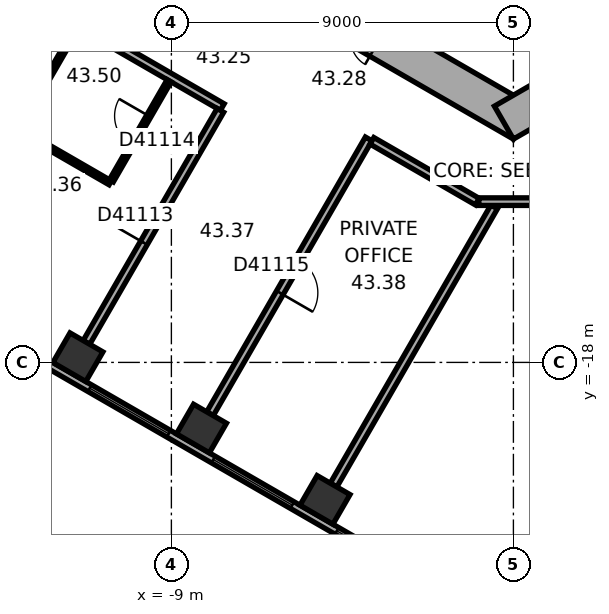
"""IFC4 building model, lengths in metres.
Left out: names, types, materials, properties, quantities, classifications, styles, units other than length and angle.
Written with IfcOpenShell. Run it as: python <this file> out.ifc"""

import sys

from ifc_helpers import new_model, si_unit, direction, frame, frame_2d, origin, origin_2d, place, context, subcontext, project, spatial, rectangle, extrude, element, fill, save


model = new_model("IFC4")
c1 = context("Model", 3, precision=1e-05, world=origin(), true_north=direction((0.0, 1.0)))
c2 = subcontext(c1, "Body", "Model", "MODEL_VIEW")
j1 = project(units=[si_unit("LENGTHUNIT", "METRE"), si_unit("PLANEANGLEUNIT", "RADIAN")], contexts=[c1])
p1 = place(None, origin())
s1 = spatial("IfcSite", under=j1, at=p1, CompositionType="ELEMENT")
p2 = place(p1, origin())
s2 = spatial("IfcBuilding", under=s1, at=p2, CompositionType="ELEMENT")
p3 = place(p2, frame((0.0, 0.0, 176.2)))
s3 = spatial("IfcBuildingStorey", under=s2, at=p3, CompositionType="ELEMENT", Elevation=176.2)
for number, where, z_axis, x_axis in (
    (1, (-11.46, -17.863, 0.0), (0.0, 0.0, 1.0), (0.866, -0.5, 0.0)),
    (2, (-8.208, -19.74, 0.0), (0.0, 0.0, 1.0), (0.866, -0.5, 0.0)),
    (3, (-4.958, -21.617, 0.0), (0.0, 0.0, 1.0), (0.866, -0.5, 0.0)),
):
    element("IfcColumn", number, at=place(p3, frame(where, z_axis=z_axis, x_axis=x_axis)), inside=s3, PredefinedType="COLUMN", context=c2, shape_type="SweptSolid", body=[
        extrude(rectangle(XDim=1.0, YDim=0.9, at=origin_2d()), origin(), (0.0, 0.0, 1.0), 3.7),
    ])
p4 = place(p3, frame((-10.25, -5.629, 0.0), z_axis=(0.0, 0.0, 1.0), x_axis=(0.866022616891, -0.50000482701, 0.0)))
e4 = element("IfcWall", 4, at=p4, inside=s3, PredefinedType="SHEAR", context=c2, shape_type="SweptSolid", body=[
    extrude(rectangle(XDim=12.125, YDim=1.0, at=frame_2d((6.062, 0.0))), origin(), (0.0, 0.0, 1.0), 3.7),
])
p5 = place(p4, frame((6.262, 0.0, 0.0)))
e5 = element("IfcOpeningElement", 5, at=p5, cuts=e4, PredefinedType="OPENING", context=c2, shape_type="SweptSolid", body=[
    extrude(rectangle(XDim=1.5, YDim=2.1, at=frame_2d((0.75, 1.05))), frame((0.0, 0.51, 0.0), z_axis=(0.0, -1.0, 0.0), x_axis=(1.0, 0.0, 0.0)), (0.0, 0.0, 1.0), 1.02),
])
p6 = place(p4, frame((1.712, 0.0, 0.0)))
e6 = element("IfcOpeningElement", 6, at=p6, cuts=e4, PredefinedType="OPENING", context=c2, shape_type="SweptSolid", body=[
    extrude(rectangle(XDim=1.1, YDim=2.1, at=frame_2d((0.55, 1.05))), frame((0.0, 0.51, 0.0), z_axis=(0.0, -1.0, 0.0), x_axis=(1.0, 0.0, 0.0)), (0.0, 0.0, 1.0), 1.02),
])
p7 = place(p4, frame((4.312, 0.0, 0.0)))
e7 = element("IfcOpeningElement", 7, at=p7, cuts=e4, PredefinedType="OPENING", context=c2, shape_type="SweptSolid", body=[
    extrude(rectangle(XDim=1.1, YDim=2.1, at=frame_2d((0.55, 1.05))), frame((0.0, 0.51, 0.0), z_axis=(0.0, -1.0, 0.0), x_axis=(1.0, 0.0, 0.0)), (0.0, 0.0, 1.0), 1.02),
])
p8 = place(p3, frame((-0.25, -11.691, 0.0), z_axis=(0.0, 0.0, 1.0), x_axis=(0.866022616891, 0.50000482701, 0.0)))
e8 = element("IfcWall", 8, at=p8, inside=s3, PredefinedType="SHEAR", context=c2, shape_type="SweptSolid", body=[
    extrude(rectangle(XDim=12.125, YDim=1.0, at=frame_2d((6.062, 0.0))), origin(), (0.0, 0.0, 1.0), 3.7),
])
p9 = place(p8, frame((2.612, 0.0, 0.0)))
e9 = element("IfcOpeningElement", 9, at=p9, cuts=e8, PredefinedType="OPENING", context=c2, shape_type="SweptSolid", body=[
    extrude(rectangle(XDim=1.1, YDim=2.1, at=frame_2d((0.55, 1.05))), frame((0.0, 0.51, 0.0), z_axis=(0.0, -1.0, 0.0), x_axis=(1.0, 0.0, 0.0)), (0.0, 0.0, 1.0), 1.02),
])
p10 = place(p8, frame((5.212, 0.0, 0.0)))
e10 = element("IfcOpeningElement", 10, at=p10, cuts=e8, PredefinedType="OPENING", context=c2, shape_type="SweptSolid", body=[
    extrude(rectangle(XDim=1.1, YDim=2.1, at=frame_2d((0.55, 1.05))), frame((0.0, 0.51, 0.0), z_axis=(0.0, -1.0, 0.0), x_axis=(1.0, 0.0, 0.0)), (0.0, 0.0, 1.0), 1.02),
])
p11 = place(p8, frame((7.812, 0.0, 0.0)))
e11 = element("IfcOpeningElement", 11, at=p11, cuts=e8, PredefinedType="OPENING", context=c2, shape_type="SweptSolid", body=[
    extrude(rectangle(XDim=1.1, YDim=2.1, at=frame_2d((0.55, 1.05))), frame((0.0, 0.51, 0.0), z_axis=(0.0, -1.0, 0.0), x_axis=(1.0, 0.0, 0.0)), (0.0, 0.0, 1.0), 1.02),
])
p12 = place(p3, frame((-18.789, -14.267, 0.0), z_axis=(0.0, 0.0, 1.0), x_axis=(0.866023315909, -0.500003616288, 0.0)))
e12 = element("IfcWall", 12, at=p12, inside=s3, PredefinedType="STANDARD", context=c2, shape_type="SweptSolid", body=[
    extrude(rectangle(XDim=20.044, YDim=0.2, at=frame_2d((10.022, 0.0))), origin(), (0.0, 0.0, 1.0), 3.7),
])
p13 = place(p12, frame((1.314, 0.0, 0.9)))
e13 = element("IfcOpeningElement", 13, at=p13, cuts=e12, PredefinedType="OPENING", context=c2, shape_type="SweptSolid", body=[
    extrude(rectangle(XDim=2.4, YDim=2.0, at=frame_2d((1.2, 1.0))), frame((0.0, 0.11, 0.0), z_axis=(0.0, -1.0, 0.0), x_axis=(1.0, 0.0, 0.0)), (0.0, 0.0, 1.0), 0.22),
])
p14 = place(p12, frame((5.069, 0.0, 0.9)))
e14 = element("IfcOpeningElement", 14, at=p14, cuts=e12, PredefinedType="OPENING", context=c2, shape_type="SweptSolid", body=[
    extrude(rectangle(XDim=2.4, YDim=2.0, at=frame_2d((1.2, 1.0))), frame((0.0, 0.11, 0.0), z_axis=(0.0, -1.0, 0.0), x_axis=(1.0, 0.0, 0.0)), (0.0, 0.0, 1.0), 0.22),
])
p15 = place(p12, frame((8.823, 0.0, 0.9)))
e15 = element("IfcOpeningElement", 15, at=p15, cuts=e12, PredefinedType="OPENING", context=c2, shape_type="SweptSolid", body=[
    extrude(rectangle(XDim=2.4, YDim=2.0, at=frame_2d((1.2, 1.0))), frame((0.0, 0.11, 0.0), z_axis=(0.0, -1.0, 0.0), x_axis=(1.0, 0.0, 0.0)), (0.0, 0.0, 1.0), 0.22),
])
p16 = place(p12, frame((12.577, 0.0, 0.9)))
e16 = element("IfcOpeningElement", 16, at=p16, cuts=e12, PredefinedType="OPENING", context=c2, shape_type="SweptSolid", body=[
    extrude(rectangle(XDim=2.4, YDim=2.0, at=frame_2d((1.2, 1.0))), frame((0.0, 0.11, 0.0), z_axis=(0.0, -1.0, 0.0), x_axis=(1.0, 0.0, 0.0)), (0.0, 0.0, 1.0), 0.22),
])
p17 = place(p12, frame((16.331, 0.0, 0.9)))
e17 = element("IfcOpeningElement", 17, at=p17, cuts=e12, PredefinedType="OPENING", context=c2, shape_type="SweptSolid", body=[
    extrude(rectangle(XDim=2.4, YDim=2.0, at=frame_2d((1.2, 1.0))), frame((0.0, 0.11, 0.0), z_axis=(0.0, -1.0, 0.0), x_axis=(1.0, 0.0, 0.0)), (0.0, 0.0, 1.0), 0.22),
])
p18 = place(p3, frame((0.013, -8.422, 0.0), z_axis=(0.0, 0.0, 1.0), x_axis=(0.500077893725, -0.86598042715, 0.0)))
e18 = element("IfcWall", 18, at=p18, inside=s3, PredefinedType="PARTITIONING", context=c2, shape_type="SweptSolid", body=[
    extrude(rectangle(XDim=2.2, YDim=0.2, at=frame_2d((1.1, 0.0))), origin(), (0.0, 0.0, 1.0), 3.42),
])
p19 = place(p3, frame((-13.035, -11.875, 0.0), z_axis=(0.0, 0.0, 1.0), x_axis=(0.500026960575, 0.86600983753, 0.0)))
e19 = element("IfcWall", 19, at=p19, inside=s3, PredefinedType="PARTITIONING", context=c2, shape_type="SweptSolid", body=[
    extrude(rectangle(XDim=3.1, YDim=0.12, at=frame_2d((1.55, 0.0))), origin(), (0.0, 0.0, 1.0), 3.42),
])
p20 = place(p3, frame((-11.435, -9.103, 0.0), z_axis=(0.0, 0.0, 1.0), x_axis=(0.866007399799, -0.500031182522, 0.0)))
e20 = element("IfcWall", 20, at=p20, inside=s3, PredefinedType="PARTITIONING", context=c2, shape_type="SweptSolid", body=[
    extrude(rectangle(XDim=4.358, YDim=0.2, at=frame_2d((2.179, 0.0))), origin(), (0.0, 0.0, 1.0), 3.42),
])
p21 = place(p3, frame((-11.235, -17.474, 0.0), z_axis=(0.0, 0.0, 1.0), x_axis=(0.500009260695, 0.866020057054, 0.0)))
e21 = element("IfcWall", 21, at=p21, inside=s3, PredefinedType="PARTITIONING", context=c2, shape_type="SweptSolid", body=[
    extrude(rectangle(XDim=7.049, YDim=0.2, at=frame_2d((3.524, 0.0))), origin(), (0.0, 0.0, 1.0), 2.87),
])
p22 = place(p21, frame((3.024, 0.0, 0.0)))
e22 = element("IfcOpeningElement", 22, at=p22, cuts=e21, PredefinedType="OPENING", context=c2, shape_type="SweptSolid", body=[
    extrude(rectangle(XDim=1.0, YDim=2.1, at=frame_2d((0.5, 1.05))), frame((0.0, 0.11, 0.0), z_axis=(0.0, -1.0, 0.0), x_axis=(1.0, 0.0, 0.0)), (0.0, 0.0, 1.0), 0.22),
])
p23 = place(p3, frame((-10.61, -13.275, 0.0), z_axis=(0.0, 0.0, 1.0), x_axis=(-0.866019409031, 0.500010383074, 0.0)))
e23 = element("IfcWall", 23, at=p23, inside=s3, PredefinedType="PARTITIONING", context=c2, shape_type="SweptSolid", body=[
    extrude(rectangle(XDim=2.74, YDim=0.12, at=frame_2d((1.37, 0.0))), origin(), (0.0, 0.0, 1.0), 3.42),
])
p24 = place(p3, frame((-9.06, -10.59, 0.0), z_axis=(0.0, 0.0, 1.0), x_axis=(-0.49993101378, -0.866065229334, 0.0)))
e24 = element("IfcWall", 24, at=p24, inside=s3, PredefinedType="PARTITIONING", context=c2, shape_type="SweptSolid", body=[
    extrude(rectangle(XDim=3.04, YDim=0.12, at=frame_2d((1.52, 0.0))), origin(), (0.0, 0.0, 1.0), 3.42),
])
p25 = place(p24, frame((1.07, 0.0, 0.0)))
e25 = element("IfcOpeningElement", 25, at=p25, cuts=e24, PredefinedType="OPENING", context=c2, shape_type="SweptSolid", body=[
    extrude(rectangle(XDim=0.9, YDim=2.1, at=frame_2d((0.45, 1.05))), frame((0.0, 0.07, 0.0), z_axis=(0.0, -1.0, 0.0), x_axis=(1.0, 0.0, 0.0)), (0.0, 0.0, 1.0), 0.14),
])
p26 = place(p3, frame((-7.984, -19.351, 0.0), z_axis=(0.0, 0.0, 1.0), x_axis=(0.500010139422, 0.866019549707, 0.0)))
e26 = element("IfcWall", 26, at=p26, inside=s3, PredefinedType="PARTITIONING", context=c2, shape_type="SweptSolid", body=[
    extrude(rectangle(XDim=8.35, YDim=0.2, at=frame_2d((4.175, 0.0))), origin(), (0.0, 0.0, 1.0), 3.42),
])
p27 = place(p26, frame((3.675, 0.0, 0.0)))
e27 = element("IfcOpeningElement", 27, at=p27, cuts=e26, PredefinedType="OPENING", context=c2, shape_type="SweptSolid", body=[
    extrude(rectangle(XDim=1.0, YDim=2.1, at=frame_2d((0.5, 1.05))), frame((0.0, 0.11, 0.0), z_axis=(0.0, -1.0, 0.0), x_axis=(1.0, 0.0, 0.0)), (0.0, 0.0, 1.0), 0.22),
])
p28 = place(p3, frame((-4.732, -21.228, 0.0), z_axis=(0.0, 0.0, 1.0), x_axis=(0.500000843414, 0.866024916838, 0.0)))
e28 = element("IfcWall", 28, at=p28, inside=s3, PredefinedType="PARTITIONING", context=c2, shape_type="SweptSolid", body=[
    extrude(rectangle(XDim=8.452, YDim=0.2, at=frame_2d((4.226, 0.0))), origin(), (0.0, 0.0, 1.0), 3.42),
])
p29 = place(p3, frame((-3.722, -12.169, 0.0), z_axis=(0.0, 0.0, 1.0), x_axis=(0.866033163891, -0.499986558861, 0.0)))
e29 = element("IfcWall", 29, at=p29, inside=s3, PredefinedType="PARTITIONING", context=c2, shape_type="SweptSolid", body=[
    extrude(rectangle(XDim=3.201, YDim=0.2, at=frame_2d((1.6, 0.0))), origin(), (0.0, 0.0, 1.0), 3.42),
])
p30 = place(p3, frame((-0.91, -13.77, 0.0), z_axis=(0.0, 0.0, 1.0), x_axis=(1.0, 0.0, 0.0)))
e30 = element("IfcWall", 30, at=p30, inside=s3, PredefinedType="PARTITIONING", context=c2, shape_type="SweptSolid", body=[
    extrude(rectangle(XDim=1.86, YDim=0.2, at=frame_2d((0.93, 0.0))), origin(), (0.0, 0.0, 1.0), 3.42),
])
p31 = place(p15, origin())
e31 = element("IfcWindow", 31, at=p31, inside=s3, PartitioningType="SINGLE_PANEL", PredefinedType="WINDOW", context=c2, shape_type="SweptSolid", body=[
    extrude(rectangle(XDim=2.4, YDim=2.0, at=frame_2d((1.2, 1.0))), frame((0.0, 0.03, 0.0), z_axis=(0.0, -1.0, 0.0), x_axis=(1.0, 0.0, 0.0)), (0.0, 0.0, 1.0), 0.06),
])
fill(e15, e31)
p32 = place(p16, origin())
e32 = element("IfcWindow", 32, at=p32, inside=s3, PartitioningType="SINGLE_PANEL", PredefinedType="WINDOW", context=c2, shape_type="SweptSolid", body=[
    extrude(rectangle(XDim=2.4, YDim=2.0, at=frame_2d((1.2, 1.0))), frame((0.0, 0.03, 0.0), z_axis=(0.0, -1.0, 0.0), x_axis=(1.0, 0.0, 0.0)), (0.0, 0.0, 1.0), 0.06),
])
fill(e16, e32)
p33 = place(p17, origin())
e33 = element("IfcWindow", 33, at=p33, inside=s3, PartitioningType="SINGLE_PANEL", PredefinedType="WINDOW", context=c2, shape_type="SweptSolid", body=[
    extrude(rectangle(XDim=2.4, YDim=2.0, at=frame_2d((1.2, 1.0))), frame((0.0, 0.03, 0.0), z_axis=(0.0, -1.0, 0.0), x_axis=(1.0, 0.0, 0.0)), (0.0, 0.0, 1.0), 0.06),
])
fill(e17, e33)
p34 = place(p22, origin())
e34 = element("IfcDoor", 34, at=p34, inside=s3, OperationType="SINGLE_SWING_LEFT", PredefinedType="DOOR", context=c2, shape_type="SweptSolid", body=[
    extrude(rectangle(XDim=1.0, YDim=2.1, at=frame_2d((0.5, 1.05))), frame((0.0, 0.025, 0.0), z_axis=(0.0, -1.0, 0.0), x_axis=(1.0, 0.0, 0.0)), (0.0, 0.0, 1.0), 0.05),
])
fill(e22, e34)
p35 = place(p25, origin())
e35 = element("IfcDoor", 35, at=p35, inside=s3, OperationType="SINGLE_SWING_LEFT", PredefinedType="DOOR", context=c2, shape_type="SweptSolid", body=[
    extrude(rectangle(XDim=0.9, YDim=2.1, at=frame_2d((0.45, 1.05))), frame((0.0, 0.025, 0.0), z_axis=(0.0, -1.0, 0.0), x_axis=(1.0, 0.0, 0.0)), (0.0, 0.0, 1.0), 0.05),
])
fill(e25, e35)
p36 = place(p27, origin())
e36 = element("IfcDoor", 36, at=p36, inside=s3, OperationType="SINGLE_SWING_LEFT", PredefinedType="DOOR", context=c2, shape_type="SweptSolid", body=[
    extrude(rectangle(XDim=1.0, YDim=2.1, at=frame_2d((0.5, 1.05))), frame((0.0, 0.025, 0.0), z_axis=(0.0, -1.0, 0.0), x_axis=(1.0, 0.0, 0.0)), (0.0, 0.0, 1.0), 0.05),
])
fill(e27, e36)
save(model, sys.argv[1])
